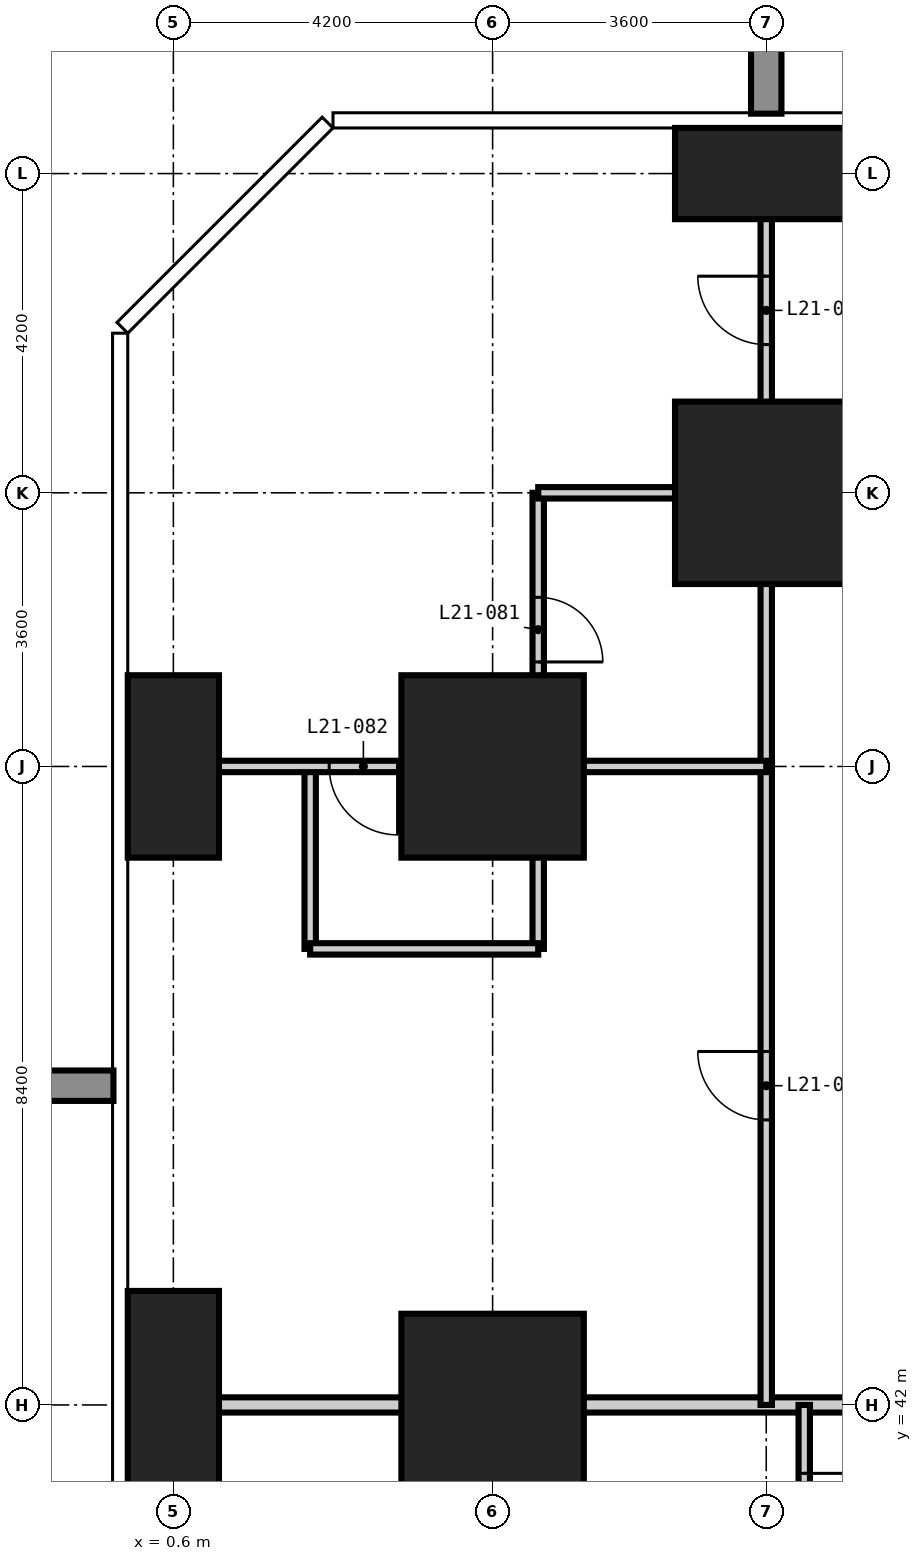
"""IFC4 building model, lengths in metres.
Left out: names, types, materials, properties, quantities, classifications, styles, units other than length and angle.
Written with IfcOpenShell. Run it as: python <this file> out.ifc"""

import sys

from ifc_helpers import new_model, si_unit, direction, frame, frame_2d, origin, origin_2d, place, context, subcontext, project, spatial, rectangle, extrude, element, fill, save


model = new_model("IFC4")
c1 = context("Model", 3, precision=1e-05, world=origin(), true_north=direction((0.0, 1.0)))
c2 = subcontext(c1, "Body", "Model", "MODEL_VIEW")
j1 = project(units=[si_unit("LENGTHUNIT", "METRE"), si_unit("PLANEANGLEUNIT", "RADIAN")], contexts=[c1])
p1 = place(None, origin())
s1 = spatial("IfcSite", under=j1, at=p1, CompositionType="ELEMENT")
p2 = place(p1, origin())
s2 = spatial("IfcBuilding", under=s1, at=p2, CompositionType="ELEMENT")
p3 = place(p2, frame((0.0, 0.0, 84.6)))
s3 = spatial("IfcBuildingStorey", under=s2, at=p3, CompositionType="ELEMENT", Elevation=84.6)
p4 = place(p3, frame((0.6, 42.0, -0.35), z_axis=(0.0, 0.0, 1.0), x_axis=(1.0, 0.0, 0.0)))
e1 = element("IfcColumn", 1, at=p4, inside=s3, PredefinedType="COLUMN", context=c2, shape_type="SweptSolid", body=[
    extrude(rectangle(XDim=1.2, YDim=3.0, at=origin_2d()), origin(), (0.0, 0.0, 1.0), 3.55),
])
p5 = place(p3, frame((0.6, 50.4, -0.35), z_axis=(0.0, 0.0, 1.0), x_axis=(1.0, 0.0, 0.0)))
e2 = element("IfcColumn", 2, at=p5, inside=s3, PredefinedType="COLUMN", context=c2, shape_type="SweptSolid", body=[
    extrude(rectangle(XDim=1.2, YDim=2.4, at=origin_2d()), origin(), (0.0, 0.0, 1.0), 3.55),
])
for number, where, z_axis, x_axis in (
    (3, (4.8, 42.0, -0.35), (0.0, 0.0, 1.0), (1.0, 0.0, 0.0)),
    (4, (4.8, 50.4, -0.35), (0.0, 0.0, 1.0), (1.0, 0.0, 0.0)),
    (5, (8.4, 54.0, -0.35), (0.0, 0.0, 1.0), (1.0, 0.0, 0.0)),
):
    element("IfcColumn", number, at=place(p3, frame(where, z_axis=z_axis, x_axis=x_axis)), inside=s3, PredefinedType="COLUMN", context=c2, shape_type="SweptSolid", body=[
        extrude(rectangle(XDim=2.4, YDim=2.4, at=origin_2d()), origin(), (0.0, 0.0, 1.0), 3.55),
    ])
p6 = place(p3, frame((8.4, 58.2, -0.35), z_axis=(0.0, 0.0, 1.0), x_axis=(1.0, 0.0, 0.0)))
e6 = element("IfcColumn", 6, at=p6, inside=s3, PredefinedType="COLUMN", context=c2, shape_type="SweptSolid", body=[
    extrude(rectangle(XDim=2.4, YDim=1.2, at=origin_2d()), origin(), (0.0, 0.0, 1.0), 3.55),
])
p7 = place(p3, frame((5.4, 50.4, 0.0), z_axis=(0.0, 0.0, 1.0), x_axis=(0.0, 1.0, 0.0)))
e7 = element("IfcWall", 7, at=p7, inside=s3, PredefinedType="PARTITIONING", context=c2, shape_type="SweptSolid", body=[
    extrude(rectangle(XDim=3.6, YDim=0.15, at=frame_2d((1.8, 0.0))), origin(), (0.0, 0.0, 1.0), 3.2),
])
p8 = place(p7, frame((1.375, 0.0, 0.0)))
e8 = element("IfcOpeningElement", 8, at=p8, cuts=e7, PredefinedType="OPENING", context=c2, shape_type="SweptSolid", body=[
    extrude(rectangle(XDim=0.85, YDim=2.1, at=frame_2d((0.425, 1.05))), frame((0.0, 0.085, 0.0), z_axis=(0.0, -1.0, 0.0), x_axis=(1.0, 0.0, 0.0)), (0.0, 0.0, 1.0), 0.17),
])
p9 = place(p3, frame((5.4, 54.0, 0.0), z_axis=(0.0, 0.0, 1.0), x_axis=(1.0, 0.0, 0.0)))
e9 = element("IfcWall", 9, at=p9, inside=s3, PredefinedType="PARTITIONING", context=c2, shape_type="SweptSolid", body=[
    extrude(rectangle(XDim=3.0, YDim=0.15, at=frame_2d((1.5, 0.0))), origin(), (0.0, 0.0, 1.0), 3.2),
])
p10 = place(p3, frame((-0.008, 42.0, 0.0), z_axis=(0.0, 0.0, 1.0), x_axis=(1.0, 0.0, 0.0)))
e10 = element("IfcWall", 10, at=p10, inside=s3, PredefinedType="PARTITIONING", context=c2, shape_type="SweptSolid", body=[
    extrude(rectangle(XDim=13.408, YDim=0.2, at=frame_2d((6.704, 0.0))), origin(), (0.0, 0.0, 1.0), 3.2),
])
for number, where, z_axis, x_axis in (
    (11, (2.4, 48.0, 0.0), (0.0, 0.0, 1.0), (0.0, 1.0, 0.0)),
    (12, (5.4, 48.0, 0.0), (0.0, 0.0, 1.0), (0.0, 1.0, 0.0)),
):
    element("IfcWall", number, at=place(p3, frame(where, z_axis=z_axis, x_axis=x_axis)), inside=s3, PredefinedType="PARTITIONING", context=c2, shape_type="SweptSolid", body=[
        extrude(rectangle(XDim=2.4, YDim=0.15, at=frame_2d((1.2, 0.0))), origin(), (0.0, 0.0, 1.0), 3.2),
    ])
p11 = place(p3, frame((8.4, 42.0, 0.0), z_axis=(0.0, 0.0, 1.0), x_axis=(0.0, 1.0, 0.0)))
e13 = element("IfcWall", 13, at=p11, inside=s3, PredefinedType="PARTITIONING", context=c2, shape_type="SweptSolid", body=[
    extrude(rectangle(XDim=16.808, YDim=0.15, at=frame_2d((8.404, 0.0))), origin(), (0.0, 0.0, 1.0), 3.2),
])
p12 = place(p11, frame((13.95, 0.0, 0.0)))
e14 = element("IfcOpeningElement", 14, at=p12, cuts=e13, PredefinedType="OPENING", context=c2, shape_type="SweptSolid", body=[
    extrude(rectangle(XDim=0.9, YDim=2.1, at=frame_2d((0.45, 1.05))), frame((0.0, 0.085, 0.0), z_axis=(0.0, -1.0, 0.0), x_axis=(1.0, 0.0, 0.0)), (0.0, 0.0, 1.0), 0.17),
])
p13 = place(p11, frame((3.75, 0.0, 0.0)))
e15 = element("IfcOpeningElement", 15, at=p13, cuts=e13, PredefinedType="OPENING", context=c2, shape_type="SweptSolid", body=[
    extrude(rectangle(XDim=0.9, YDim=2.1, at=frame_2d((0.45, 1.05))), frame((0.0, 0.085, 0.0), z_axis=(0.0, -1.0, 0.0), x_axis=(1.0, 0.0, 0.0)), (0.0, 0.0, 1.0), 0.17),
])
p14 = place(p3, frame((8.9, 39.3, 0.0), z_axis=(0.0, 0.0, 1.0), x_axis=(0.0, 1.0, 0.0)))
e16 = element("IfcWall", 16, at=p14, inside=s3, PredefinedType="PARTITIONING", context=c2, shape_type="SweptSolid", body=[
    extrude(rectangle(XDim=2.7, YDim=0.15, at=frame_2d((1.35, 0.0))), origin(), (0.0, 0.0, 1.0), 3.2),
])
p15 = place(p14, frame((0.9, 0.0, 0.0)))
e17 = element("IfcOpeningElement", 17, at=p15, cuts=e16, PredefinedType="OPENING", context=c2, shape_type="SweptSolid", body=[
    extrude(rectangle(XDim=0.9, YDim=2.1, at=frame_2d((0.45, 1.05))), frame((0.0, 0.085, 0.0), z_axis=(0.0, -1.0, 0.0), x_axis=(1.0, 0.0, 0.0)), (0.0, 0.0, 1.0), 0.17),
])
p16 = place(p3, frame((2.4, 48.0, 0.0), z_axis=(0.0, 0.0, 1.0), x_axis=(1.0, 0.0, 0.0)))
e18 = element("IfcWall", 18, at=p16, inside=s3, PredefinedType="PARTITIONING", context=c2, shape_type="SweptSolid", body=[
    extrude(rectangle(XDim=3.0, YDim=0.15, at=frame_2d((1.5, 0.0))), origin(), (0.0, 0.0, 1.0), 3.2),
])
p17 = place(p3, frame((-0.008, 50.4, 0.0), z_axis=(0.0, 0.0, 1.0), x_axis=(1.0, 0.0, 0.0)))
e19 = element("IfcWall", 19, at=p17, inside=s3, PredefinedType="PARTITIONING", context=c2, shape_type="SweptSolid", body=[
    extrude(rectangle(XDim=8.408, YDim=0.15, at=frame_2d((4.204, 0.0))), origin(), (0.0, 0.0, 1.0), 3.2),
])
p18 = place(p17, frame((2.658, 0.0, 0.0)))
e20 = element("IfcOpeningElement", 20, at=p18, cuts=e19, PredefinedType="OPENING", context=c2, shape_type="SweptSolid", body=[
    extrude(rectangle(XDim=0.9, YDim=2.1, at=frame_2d((0.45, 1.05))), frame((0.0, 0.085, 0.0), z_axis=(0.0, -1.0, 0.0), x_axis=(1.0, 0.0, 0.0)), (0.0, 0.0, 1.0), 0.17),
])
p19 = place(p15, frame((0.9, 0.0, 0.0), z_axis=(0.0, 0.0, 1.0), x_axis=(-1.0, 0.0, 0.0)))
e21 = element("IfcDoor", 21, at=p19, inside=s3, OperationType="SINGLE_SWING_LEFT", PredefinedType="DOOR", context=c2, shape_type="SweptSolid", body=[
    extrude(rectangle(XDim=0.9, YDim=2.1, at=frame_2d((0.45, 1.05))), frame((0.0, 0.025, 0.0), z_axis=(0.0, -1.0, 0.0), x_axis=(1.0, 0.0, 0.0)), (0.0, 0.0, 1.0), 0.05),
])
fill(e17, e21)
p20 = place(p12, origin())
e22 = element("IfcDoor", 22, at=p20, inside=s3, OperationType="SINGLE_SWING_RIGHT", PredefinedType="DOOR", context=c2, shape_type="SweptSolid", body=[
    extrude(rectangle(XDim=0.9, YDim=2.1, at=frame_2d((0.45, 1.05))), frame((0.0, 0.025, 0.0), z_axis=(0.0, -1.0, 0.0), x_axis=(1.0, 0.0, 0.0)), (0.0, 0.0, 1.0), 0.05),
])
fill(e14, e22)
p21 = place(p8, frame((0.85, 0.0, 0.0), z_axis=(0.0, 0.0, 1.0), x_axis=(-1.0, 0.0, 0.0)))
e23 = element("IfcDoor", 23, at=p21, inside=s3, OperationType="SINGLE_SWING_RIGHT", PredefinedType="DOOR", context=c2, shape_type="SweptSolid", body=[
    extrude(rectangle(XDim=0.85, YDim=2.1, at=frame_2d((0.425, 1.05))), frame((0.0, 0.025, 0.0), z_axis=(0.0, -1.0, 0.0), x_axis=(1.0, 0.0, 0.0)), (0.0, 0.0, 1.0), 0.05),
])
fill(e8, e23)
p22 = place(p18, frame((0.9, 0.0, 0.0), z_axis=(0.0, 0.0, 1.0), x_axis=(-1.0, 0.0, 0.0)))
e24 = element("IfcDoor", 24, at=p22, inside=s3, OperationType="SINGLE_SWING_LEFT", PredefinedType="DOOR", context=c2, shape_type="SweptSolid", body=[
    extrude(rectangle(XDim=0.9, YDim=2.1, at=frame_2d((0.45, 1.05))), frame((0.0, 0.025, 0.0), z_axis=(0.0, -1.0, 0.0), x_axis=(1.0, 0.0, 0.0)), (0.0, 0.0, 1.0), 0.05),
])
fill(e20, e24)
p23 = place(p13, origin())
e25 = element("IfcDoor", 25, at=p23, inside=s3, OperationType="SINGLE_SWING_RIGHT", PredefinedType="DOOR", context=c2, shape_type="SweptSolid", body=[
    extrude(rectangle(XDim=0.9, YDim=2.1, at=frame_2d((0.45, 1.05))), frame((0.0, 0.025, 0.0), z_axis=(0.0, -1.0, 0.0), x_axis=(1.0, 0.0, 0.0)), (0.0, 0.0, 1.0), 0.05),
])
fill(e15, e25)
save(model, sys.argv[1])
